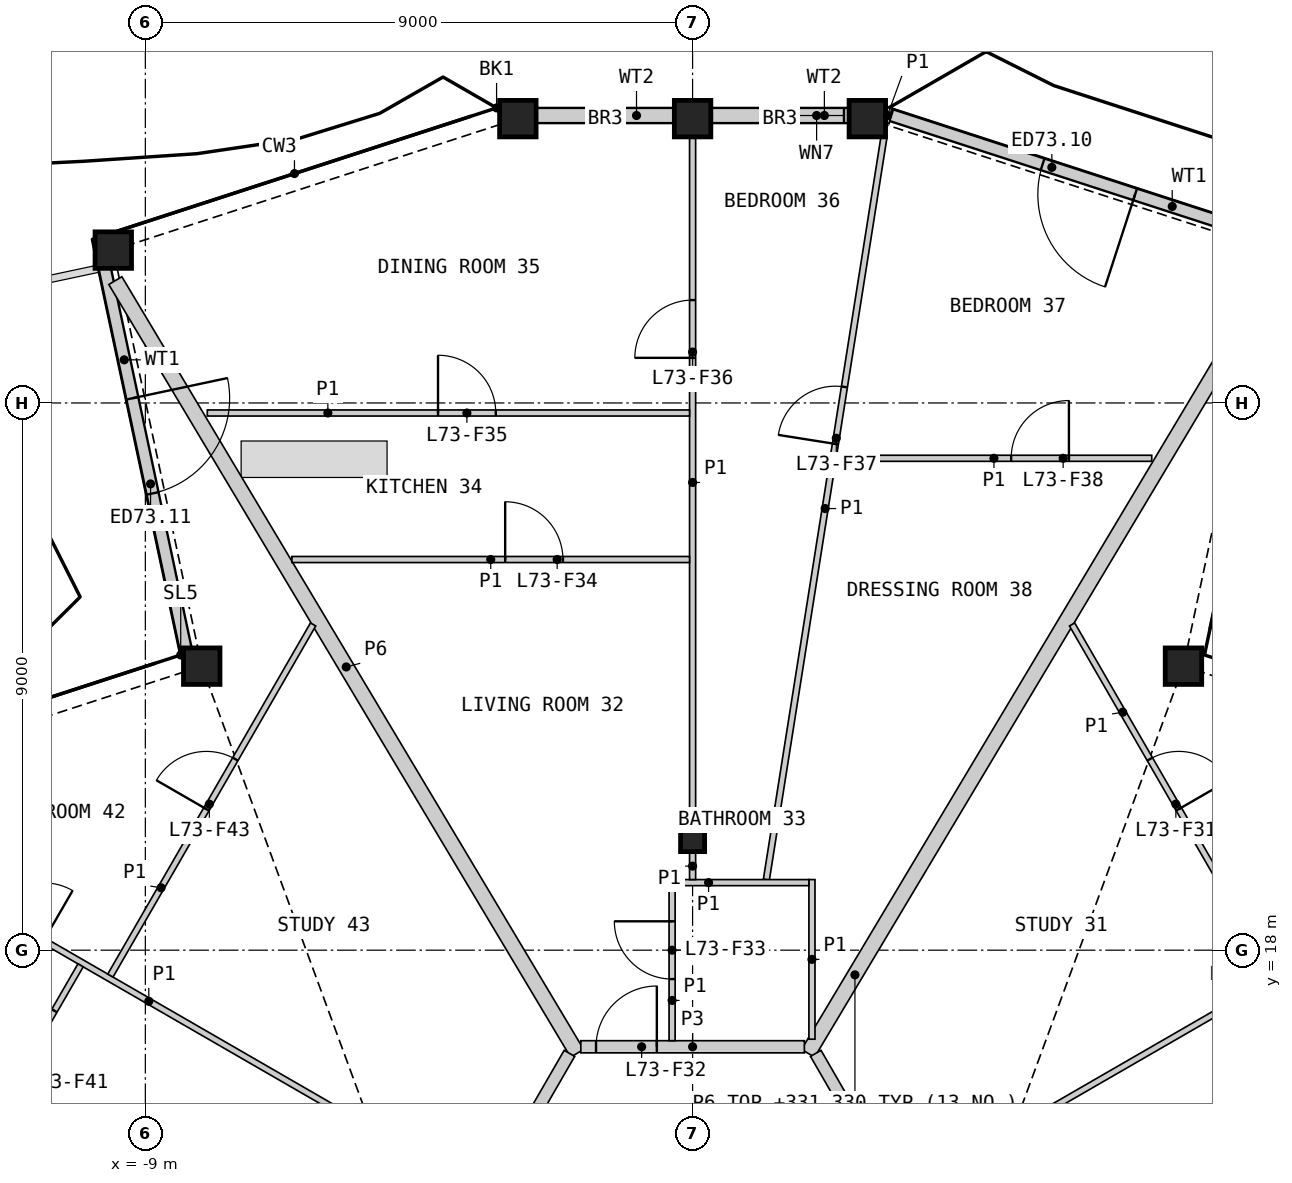
"""IFC4 building model, lengths in metres.
Left out: names, types, materials, properties, quantities, classifications, styles, units other than length and angle.
Written with IfcOpenShell. Run it as: python <this file> out.ifc"""

import sys

from ifc_helpers import new_model, si_unit, direction, frame, frame_2d, origin, origin_2d, place, context, subcontext, project, spatial, rectangle, hollow_rectangle, i_section, extrude, element, fill, save


model = new_model("IFC4")
c1 = context("Model", 3, precision=1e-05, world=origin(), true_north=direction((0.0, 1.0)))
c2 = subcontext(c1, "Body", "Model", "MODEL_VIEW")
j1 = project(units=[si_unit("LENGTHUNIT", "METRE"), si_unit("PLANEANGLEUNIT", "RADIAN")], contexts=[c1])
p1 = place(None, origin())
s1 = spatial("IfcSite", under=j1, at=p1, CompositionType="ELEMENT")
p2 = place(p1, origin())
s2 = spatial("IfcBuilding", under=s1, at=p2, CompositionType="ELEMENT")
p3 = place(p2, frame((0.0, 0.0, 329.0)))
s3 = spatial("IfcBuildingStorey", under=s2, at=p3, CompositionType="ELEMENT", Elevation=329.0)
for number, where, z_axis, x_axis in (
    (1, (8.073, 22.671, 0.0), (0.0, 0.0, 1.0), (1.0, 0.0, 0.0)),
    (2, (2.874, 31.676, 0.0), (0.0, 0.0, 1.0), (1.0, 0.0, 0.0)),
    (3, (0.0, 31.676, 0.0), (0.0, 0.0, 1.0), (1.0, 0.0, 0.0)),
    (4, (-2.874, 31.676, 0.0), (0.0, 0.0, 1.0), (1.0, 0.0, 0.0)),
    (5, (-9.527, 29.514, 0.0), (0.0, 0.0, 1.0), (1.0, 0.0, 0.0)),
    (6, (-8.073, 22.671, 0.0), (0.0, 0.0, 1.0), (1.0, 0.0, 0.0)),
):
    element("IfcColumn", number, at=place(p3, frame(where, z_axis=z_axis, x_axis=x_axis)), inside=s3, PredefinedType="COLUMN", context=c2, shape_type="SweptSolid", body=[
        extrude(hollow_rectangle(XDim=0.6, YDim=0.6, WallThickness=0.04, at=origin_2d()), origin(), (0.0, 0.0, 1.0), 3.4),
    ])
p4 = place(p3, frame((0.0, 19.811, 0.0), z_axis=(0.0, 0.0, 1.0), x_axis=(1.0, 0.0, 0.0)))
e7 = element("IfcColumn", 7, at=p4, inside=s3, PredefinedType="COLUMN", context=c2, shape_type="SweptSolid", body=[
    extrude(i_section(OverallWidth=0.396, OverallDepth=0.381, WebThickness=0.019, FlangeThickness=0.03, at=origin_2d()), origin(), (0.0, 0.0, 1.0), 3.4),
])
p5 = place(p3, frame((9.428, 29.732, 0.0), z_axis=(0.0, 0.0, 1.0), x_axis=(-0.951057057516, 0.309015328664, 0.0)))
e8 = element("IfcWall", 8, at=p5, inside=s3, PredefinedType="SOLIDWALL", context=c2, shape_type="SweptSolid", body=[
    extrude(rectangle(XDim=6.477, YDim=0.2, at=frame_2d((3.238, 0.0))), origin(), (0.0, 0.0, 1.0), 2.488),
])
p6 = place(p5, frame((2.261, 0.0, 0.0)))
e9 = element("IfcOpeningElement", 9, at=p6, cuts=e8, PredefinedType="OPENING", context=c2, shape_type="SweptSolid", body=[
    extrude(rectangle(XDim=1.6, YDim=2.25, at=frame_2d((0.8, 1.125))), frame((0.0, 0.11, 0.0), z_axis=(0.0, -1.0, 0.0), x_axis=(1.0, 0.0, 0.0)), (0.0, 0.0, 1.0), 0.22),
])
p7 = place(p3, frame((2.79, 31.728, 0.0), z_axis=(0.0, 0.0, 1.0), x_axis=(-1.0, 0.0, 0.0)))
e10 = element("IfcWall", 10, at=p7, inside=s3, PredefinedType="SOLIDWALL", context=c2, shape_type="SweptSolid", body=[
    extrude(rectangle(XDim=2.49, YDim=0.25, at=frame_2d((1.245, 0.0))), origin(), (0.0, 0.0, 1.0), 2.488),
])
p8 = place(p7, frame((0.3, 0.0, 0.4)))
e11 = element("IfcOpeningElement", 11, at=p8, cuts=e10, PredefinedType="OPENING", context=c2, shape_type="SweptSolid", body=[
    extrude(rectangle(XDim=0.9, YDim=0.6, at=frame_2d((0.45, 0.3))), frame((0.0, 0.135, 0.0), z_axis=(0.0, -1.0, 0.0), x_axis=(1.0, 0.0, 0.0)), (0.0, 0.0, 1.0), 0.27),
])
p9 = place(p3, frame((-0.3, 31.728, 0.0), z_axis=(0.0, 0.0, 1.0), x_axis=(-1.0, 0.0, 0.0)))
e12 = element("IfcWall", 12, at=p9, inside=s3, PredefinedType="SOLIDWALL", context=c2, shape_type="SweptSolid", body=[
    extrude(rectangle(XDim=2.49, YDim=0.25, at=frame_2d((1.245, 0.0))), origin(), (0.0, 0.0, 1.0), 2.488),
])
p10 = place(p3, frame((-9.684, 29.289, 0.0), z_axis=(0.0, 0.0, 1.0), x_axis=(0.207920686021, -0.978145688701, 0.0)))
e13 = element("IfcWall", 13, at=p10, inside=s3, PredefinedType="SOLIDWALL", context=c2, shape_type="SweptSolid", body=[
    extrude(rectangle(XDim=6.459, YDim=0.2, at=frame_2d((3.229, 0.0))), origin(), (0.0, 0.0, 1.0), 2.488),
])
p11 = place(p10, frame((2.261, 0.0, 0.0)))
e14 = element("IfcOpeningElement", 14, at=p11, cuts=e13, PredefinedType="OPENING", context=c2, shape_type="SweptSolid", body=[
    extrude(rectangle(XDim=1.6, YDim=2.25, at=frame_2d((0.8, 1.125))), frame((0.0, 0.11, 0.0), z_axis=(0.0, -1.0, 0.0), x_axis=(1.0, 0.0, 0.0)), (0.0, 0.0, 1.0), 0.22),
])
p12 = place(p3, frame((1.899, 16.304, 0.0), z_axis=(0.0, 0.0, 1.0), x_axis=(0.512977925681, 0.858401798556, 0.0)))
e15 = element("IfcWall", 15, at=p12, inside=s3, PredefinedType="PARTITIONING", context=c2, shape_type="SweptSolid", body=[
    extrude(rectangle(XDim=15.028, YDim=0.25, at=frame_2d((7.514, 0.0))), origin(), (0.0, 0.0, 1.0), 2.33),
])
p13 = place(p3, frame((-9.493, 29.012, 0.0), z_axis=(0.0, 0.0, 1.0), x_axis=(0.512967150926, -0.85840823742, 0.0)))
e16 = element("IfcWall", 16, at=p13, inside=s3, PredefinedType="PARTITIONING", context=c2, shape_type="SweptSolid", body=[
    extrude(rectangle(XDim=14.805, YDim=0.25, at=frame_2d((7.402, 0.0))), origin(), (0.0, 0.0, 1.0), 2.33),
])
for number, where, z_axis, x_axis in (
    (17, (2.025, 16.303, 0.0), (0.0, 0.0, 1.0), (0.5, -0.866, 0.0)),
    (18, (-4.169, 12.59, 0.0), (0.0, 0.0, 1.0), (0.5, 0.866, 0.0)),
):
    element("IfcWall", number, at=place(p3, frame(where, z_axis=z_axis, x_axis=x_axis)), inside=s3, PredefinedType="PARTITIONING", context=c2, shape_type="SweptSolid", body=[
        extrude(rectangle(XDim=4.288, YDim=0.2, at=frame_2d((2.144, 0.0))), origin(), (0.0, 0.0, 1.0), 3.1),
    ])
p14 = place(p3, frame((-1.838, 16.411, 0.0), z_axis=(0.0, 0.0, 1.0), x_axis=(1.0, 0.0, 0.0)))
e19 = element("IfcWall", 19, at=p14, inside=s3, PredefinedType="PARTITIONING", context=c2, shape_type="SweptSolid", body=[
    extrude(rectangle(XDim=3.676, YDim=0.2, at=frame_2d((1.838, 0.0))), origin(), (0.0, 0.0, 1.0), 3.1),
])
p15 = place(p14, frame((0.25, 0.0, 0.0)))
e20 = element("IfcOpeningElement", 20, at=p15, cuts=e19, PredefinedType="OPENING", context=c2, shape_type="SweptSolid", body=[
    extrude(rectangle(XDim=1.0, YDim=2.1, at=frame_2d((0.5, 1.05))), frame((0.0, 0.11, 0.0), z_axis=(0.0, -1.0, 0.0), x_axis=(1.0, 0.0, 0.0)), (0.0, 0.0, 1.0), 0.22),
])
p16 = place(p3, frame((-14.417, 20.32, 0.0), z_axis=(0.0, 0.0, 1.0), x_axis=(0.866021216079, -0.500007253249, 0.0)))
e21 = element("IfcWall", 21, at=p16, inside=s3, PredefinedType="PARTITIONING", context=c2, shape_type="SweptSolid", body=[
    extrude(rectangle(XDim=12.639, YDim=0.1, at=frame_2d((6.32, 0.0))), origin(), (0.0, 0.0, 1.0), 2.33),
])
p17 = place(p16, frame((3.375, 0.0, 0.0)))
e22 = element("IfcOpeningElement", 22, at=p17, cuts=e21, PredefinedType="OPENING", context=c2, shape_type="SweptSolid", body=[
    extrude(rectangle(XDim=0.95, YDim=2.1, at=frame_2d((0.475, 1.05))), frame((0.0, 0.06, 0.0), z_axis=(0.0, -1.0, 0.0), x_axis=(1.0, 0.0, 0.0)), (0.0, 0.0, 1.0), 0.12),
])
p18 = place(p3, frame((3.47, 14.0, 0.0), z_axis=(0.0, 0.0, 1.0), x_axis=(0.866021216079, 0.500007253249, 0.0)))
e23 = element("IfcWall", 23, at=p18, inside=s3, PredefinedType="PARTITIONING", context=c2, shape_type="SweptSolid", body=[
    extrude(rectangle(XDim=12.639, YDim=0.1, at=frame_2d((6.32, 0.0))), origin(), (0.0, 0.0, 1.0), 2.33),
])
p19 = place(p18, frame((8.314, 0.0, 0.0)))
e24 = element("IfcOpeningElement", 24, at=p19, cuts=e23, PredefinedType="OPENING", context=c2, shape_type="SweptSolid", body=[
    extrude(rectangle(XDim=0.95, YDim=2.1, at=frame_2d((0.475, 1.05))), frame((0.0, 0.06, 0.0), z_axis=(0.0, -1.0, 0.0), x_axis=(1.0, 0.0, 0.0)), (0.0, 0.0, 1.0), 0.12),
])
p20 = place(p3, frame((1.213, 19.16, 0.0), z_axis=(0.0, 0.0, 1.0), x_axis=(0.156426176129, 0.987689653394, 0.0)))
e25 = element("IfcWall", 25, at=p20, inside=s3, PredefinedType="PARTITIONING", context=c2, shape_type="SweptSolid", body=[
    extrude(rectangle(XDim=12.358, YDim=0.1, at=frame_2d((6.179, 0.0))), origin(), (0.0, 0.0, 1.0), 2.33),
])
p21 = place(p20, frame((7.255, 0.0, 0.0)))
e26 = element("IfcOpeningElement", 26, at=p21, cuts=e25, PredefinedType="OPENING", context=c2, shape_type="SweptSolid", body=[
    extrude(rectangle(XDim=0.95, YDim=2.1, at=frame_2d((0.475, 1.05))), frame((0.0, 0.06, 0.0), z_axis=(0.0, -1.0, 0.0), x_axis=(1.0, 0.0, 0.0)), (0.0, 0.0, 1.0), 0.12),
])
p22 = place(p3, frame((0.0, 20.019, 0.0), z_axis=(0.0, 0.0, 1.0), x_axis=(0.0, 1.0, 0.0)))
e27 = element("IfcWall", 27, at=p22, inside=s3, PredefinedType="PARTITIONING", context=c2, shape_type="SweptSolid", body=[
    extrude(rectangle(XDim=11.347, YDim=0.1, at=frame_2d((5.674, 0.0))), origin(), (0.0, 0.0, 1.0), 2.33),
])
p23 = place(p22, frame((7.723, 0.0, 0.0)))
e28 = element("IfcOpeningElement", 28, at=p23, cuts=e27, PredefinedType="OPENING", context=c2, shape_type="SweptSolid", body=[
    extrude(rectangle(XDim=0.95, YDim=2.1, at=frame_2d((0.475, 1.05))), frame((0.0, 0.06, 0.0), z_axis=(0.0, -1.0, 0.0), x_axis=(1.0, 0.0, 0.0)), (0.0, 0.0, 1.0), 0.12),
])
p24 = place(p3, frame((-7.981, 26.835, 0.0), z_axis=(0.0, 0.0, 1.0), x_axis=(1.0, 0.0, 0.0)))
e29 = element("IfcWall", 29, at=p24, inside=s3, PredefinedType="PARTITIONING", context=c2, shape_type="SweptSolid", body=[
    extrude(rectangle(XDim=7.931, YDim=0.1, at=frame_2d((3.966, 0.0))), origin(), (0.0, 0.0, 1.0), 2.33),
])
p25 = place(p24, frame((3.794, 0.0, 0.0)))
e30 = element("IfcOpeningElement", 30, at=p25, cuts=e29, PredefinedType="OPENING", context=c2, shape_type="SweptSolid", body=[
    extrude(rectangle(XDim=0.95, YDim=2.1, at=frame_2d((0.475, 1.05))), frame((0.0, 0.06, 0.0), z_axis=(0.0, -1.0, 0.0), x_axis=(1.0, 0.0, 0.0)), (0.0, 0.0, 1.0), 0.12),
])
p26 = place(p3, frame((6.241, 23.357, 0.0), z_axis=(0.0, 0.0, 1.0), x_axis=(0.499998189891, -0.866026448849, 0.0)))
e31 = element("IfcWall", 31, at=p26, inside=s3, PredefinedType="PARTITIONING", context=c2, shape_type="SweptSolid", body=[
    extrude(rectangle(XDim=6.668, YDim=0.1, at=frame_2d((3.334, 0.0))), origin(), (0.0, 0.0, 1.0), 2.33),
])
p27 = place(p26, frame((2.558, 0.0, 0.0)))
e32 = element("IfcOpeningElement", 32, at=p27, cuts=e31, PredefinedType="OPENING", context=c2, shape_type="SweptSolid", body=[
    extrude(rectangle(XDim=0.95, YDim=2.1, at=frame_2d((0.475, 1.05))), frame((0.0, 0.06, 0.0), z_axis=(0.0, -1.0, 0.0), x_axis=(1.0, 0.0, 0.0)), (0.0, 0.0, 1.0), 0.12),
])
p28 = place(p3, frame((-9.575, 17.583, 0.0), z_axis=(0.0, 0.0, 1.0), x_axis=(0.499998189891, 0.866026448849, 0.0)))
e33 = element("IfcWall", 33, at=p28, inside=s3, PredefinedType="PARTITIONING", context=c2, shape_type="SweptSolid", body=[
    extrude(rectangle(XDim=6.668, YDim=0.1, at=frame_2d((3.334, 0.0))), origin(), (0.0, 0.0, 1.0), 2.33),
])
p29 = place(p28, frame((3.16, 0.0, 0.0)))
e34 = element("IfcOpeningElement", 34, at=p29, cuts=e33, PredefinedType="OPENING", context=c2, shape_type="SweptSolid", body=[
    extrude(rectangle(XDim=0.95, YDim=2.1, at=frame_2d((0.475, 1.05))), frame((0.0, 0.06, 0.0), z_axis=(0.0, -1.0, 0.0), x_axis=(1.0, 0.0, 0.0)), (0.0, 0.0, 1.0), 0.12),
])
p30 = place(p3, frame((-6.59, 24.425, 0.0), z_axis=(0.0, 0.0, 1.0), x_axis=(1.0, 0.0, 0.0)))
e35 = element("IfcWall", 35, at=p30, inside=s3, PredefinedType="PARTITIONING", context=c2, shape_type="SweptSolid", body=[
    extrude(rectangle(XDim=6.54, YDim=0.1, at=frame_2d((3.27, 0.0))), origin(), (0.0, 0.0, 1.0), 2.33),
])
p31 = place(p30, frame((3.508, 0.0, 0.0)))
e36 = element("IfcOpeningElement", 36, at=p31, cuts=e35, PredefinedType="OPENING", context=c2, shape_type="SweptSolid", body=[
    extrude(rectangle(XDim=0.95, YDim=2.1, at=frame_2d((0.475, 1.05))), frame((0.0, 0.06, 0.0), z_axis=(0.0, -1.0, 0.0), x_axis=(1.0, 0.0, 0.0)), (0.0, 0.0, 1.0), 0.12),
])
p32 = place(p3, frame((2.361, 26.09, 0.0), z_axis=(0.0, 0.0, 1.0), x_axis=(1.0, 0.0, 0.0)))
e37 = element("IfcWall", 37, at=p32, inside=s3, PredefinedType="PARTITIONING", context=c2, shape_type="SweptSolid", body=[
    extrude(rectangle(XDim=5.19, YDim=0.1, at=frame_2d((2.595, 0.0))), origin(), (0.0, 0.0, 1.0), 2.33),
])
p33 = place(p32, frame((2.878, 0.0, 0.0)))
e38 = element("IfcOpeningElement", 38, at=p33, cuts=e37, PredefinedType="OPENING", context=c2, shape_type="SweptSolid", body=[
    extrude(rectangle(XDim=0.95, YDim=2.1, at=frame_2d((0.475, 1.05))), frame((0.0, 0.06, 0.0), z_axis=(0.0, -1.0, 0.0), x_axis=(1.0, 0.0, 0.0)), (0.0, 0.0, 1.0), 0.12),
])
p34 = place(p3, frame((-12.575, 13.403, 0.0), z_axis=(0.0, 0.0, 1.0), x_axis=(0.499989096993, 0.866031698547, 0.0)))
e39 = element("IfcWall", 39, at=p34, inside=s3, PredefinedType="PARTITIONING", context=c2, shape_type="SweptSolid", body=[
    extrude(rectangle(XDim=5.02, YDim=0.1, at=frame_2d((2.51, 0.0))), origin(), (0.0, 0.0, 1.0), 2.33),
])
p35 = place(p34, frame((3.208, 0.0, 0.0)))
e40 = element("IfcOpeningElement", 40, at=p35, cuts=e39, PredefinedType="OPENING", context=c2, shape_type="SweptSolid", body=[
    extrude(rectangle(XDim=0.95, YDim=2.1, at=frame_2d((0.475, 1.05))), frame((0.0, 0.06, 0.0), z_axis=(0.0, -1.0, 0.0), x_axis=(1.0, 0.0, 0.0)), (0.0, 0.0, 1.0), 0.12),
])
p36 = place(p3, frame((-0.337, 16.511, 0.0), z_axis=(0.0, 0.0, 1.0), x_axis=(0.0, 1.0, 0.0)))
e41 = element("IfcWall", 41, at=p36, inside=s3, PredefinedType="PARTITIONING", context=c2, shape_type="SweptSolid", body=[
    extrude(rectangle(XDim=2.65, YDim=0.1, at=frame_2d((1.325, 0.0))), origin(), (0.0, 0.0, 1.0), 2.33),
])
p37 = place(p36, frame((1.014, 0.0, 0.0)))
e42 = element("IfcOpeningElement", 42, at=p37, cuts=e41, PredefinedType="OPENING", context=c2, shape_type="SweptSolid", body=[
    extrude(rectangle(XDim=0.95, YDim=2.1, at=frame_2d((0.475, 1.05))), frame((0.0, 0.06, 0.0), z_axis=(0.0, -1.0, 0.0), x_axis=(1.0, 0.0, 0.0)), (0.0, 0.0, 1.0), 0.12),
])
p38 = place(p3, frame((1.963, 16.536, 0.0), z_axis=(0.0, 0.0, 1.0), x_axis=(0.0, 1.0, 0.0)))
e43 = element("IfcWall", 43, at=p38, inside=s3, PredefinedType="PARTITIONING", context=c2, shape_type="SweptSolid", body=[
    extrude(rectangle(XDim=2.625, YDim=0.1, at=frame_2d((1.312, 0.0))), origin(), (0.0, 0.0, 1.0), 2.33),
])
p39 = place(p3, frame((-0.287, 19.111, 0.0), z_axis=(0.0, 0.0, 1.0), x_axis=(1.0, 0.0, 0.0)))
e44 = element("IfcWall", 44, at=p39, inside=s3, PredefinedType="PARTITIONING", context=c2, shape_type="SweptSolid", body=[
    extrude(rectangle(XDim=2.2, YDim=0.1, at=frame_2d((1.1, 0.0))), origin(), (0.0, 0.0, 1.0), 2.33),
])
p40 = place(p3, frame((0.0, 19.161, 0.0), z_axis=(0.0, 0.0, 1.0), x_axis=(0.0, 1.0, 0.0)))
e45 = element("IfcWall", 45, at=p40, inside=s3, PredefinedType="PARTITIONING", context=c2, shape_type="SweptSolid", body=[
    extrude(rectangle(XDim=0.442, YDim=0.1, at=frame_2d((0.221, 0.0))), origin(), (0.0, 0.0, 1.0), 2.33),
])
p41 = place(p3, frame((3.184, 31.601, 0.0), z_axis=(0.0, 0.0, 1.0), x_axis=(0.156307264128, 0.987708478844, 0.0)))
e46 = element("IfcWall", 46, at=p41, inside=s3, PredefinedType="PARTITIONING", context=c2, shape_type="SweptSolid", body=[
    extrude(rectangle(XDim=0.255, YDim=0.1, at=frame_2d((0.127, 0.0))), origin(), (0.0, 0.0, 1.0), 2.33),
])
p42 = place(p6, origin())
e47 = element("IfcDoor", 47, at=p42, inside=s3, OperationType="DOUBLE_DOOR_SINGLE_SWING", PredefinedType="DOOR", context=c2, shape_type="SweptSolid", body=[
    extrude(rectangle(XDim=1.6, YDim=2.25, at=frame_2d((0.8, 1.125))), frame((0.0, 0.025, 0.0), z_axis=(0.0, -1.0, 0.0), x_axis=(1.0, 0.0, 0.0)), (0.0, 0.0, 1.0), 0.05),
])
fill(e9, e47)
p43 = place(p8, origin())
e48 = element("IfcWindow", 48, at=p43, inside=s3, PartitioningType="SINGLE_PANEL", PredefinedType="WINDOW", context=c2, shape_type="SweptSolid", body=[
    extrude(rectangle(XDim=0.9, YDim=0.6, at=frame_2d((0.45, 0.3))), frame((0.0, 0.03, 0.0), z_axis=(0.0, -1.0, 0.0), x_axis=(1.0, 0.0, 0.0)), (0.0, 0.0, 1.0), 0.06),
])
fill(e11, e48)
p44 = place(p11, origin())
e49 = element("IfcDoor", 49, at=p44, inside=s3, OperationType="DOUBLE_DOOR_SINGLE_SWING", PredefinedType="DOOR", context=c2, shape_type="SweptSolid", body=[
    extrude(rectangle(XDim=1.6, YDim=2.25, at=frame_2d((0.8, 1.125))), frame((0.0, 0.025, 0.0), z_axis=(0.0, -1.0, 0.0), x_axis=(1.0, 0.0, 0.0)), (0.0, 0.0, 1.0), 0.05),
])
fill(e14, e49)
p45 = place(p27, origin())
e50 = element("IfcDoor", 50, at=p45, inside=s3, OperationType="SINGLE_SWING_RIGHT", PredefinedType="DOOR", context=c2, shape_type="SweptSolid", body=[
    extrude(rectangle(XDim=0.95, YDim=2.1, at=frame_2d((0.475, 1.05))), frame((0.0, 0.025, 0.0), z_axis=(0.0, -1.0, 0.0), x_axis=(1.0, 0.0, 0.0)), (0.0, 0.0, 1.0), 0.05),
])
fill(e32, e50)
p46 = place(p15, origin())
e51 = element("IfcDoor", 51, at=p46, inside=s3, OperationType="SINGLE_SWING_RIGHT", PredefinedType="DOOR", context=c2, shape_type="SweptSolid", body=[
    extrude(rectangle(XDim=1.0, YDim=2.1, at=frame_2d((0.5, 1.05))), frame((0.0, 0.025, 0.0), z_axis=(0.0, -1.0, 0.0), x_axis=(1.0, 0.0, 0.0)), (0.0, 0.0, 1.0), 0.05),
])
fill(e20, e51)
p47 = place(p37, origin())
e52 = element("IfcDoor", 52, at=p47, inside=s3, OperationType="SINGLE_SWING_RIGHT", PredefinedType="DOOR", context=c2, shape_type="SweptSolid", body=[
    extrude(rectangle(XDim=0.95, YDim=2.1, at=frame_2d((0.475, 1.05))), frame((0.0, 0.025, 0.0), z_axis=(0.0, -1.0, 0.0), x_axis=(1.0, 0.0, 0.0)), (0.0, 0.0, 1.0), 0.05),
])
fill(e42, e52)
p48 = place(p31, origin())
e53 = element("IfcDoor", 53, at=p48, inside=s3, OperationType="SINGLE_SWING_LEFT", PredefinedType="DOOR", context=c2, shape_type="SweptSolid", body=[
    extrude(rectangle(XDim=0.95, YDim=2.1, at=frame_2d((0.475, 1.05))), frame((0.0, 0.025, 0.0), z_axis=(0.0, -1.0, 0.0), x_axis=(1.0, 0.0, 0.0)), (0.0, 0.0, 1.0), 0.05),
])
fill(e36, e53)
p49 = place(p25, origin())
e54 = element("IfcDoor", 54, at=p49, inside=s3, OperationType="SINGLE_SWING_LEFT", PredefinedType="DOOR", context=c2, shape_type="SweptSolid", body=[
    extrude(rectangle(XDim=0.95, YDim=2.1, at=frame_2d((0.475, 1.05))), frame((0.0, 0.025, 0.0), z_axis=(0.0, -1.0, 0.0), x_axis=(1.0, 0.0, 0.0)), (0.0, 0.0, 1.0), 0.05),
])
fill(e30, e54)
p50 = place(p23, origin())
e55 = element("IfcDoor", 55, at=p50, inside=s3, OperationType="SINGLE_SWING_LEFT", PredefinedType="DOOR", context=c2, shape_type="SweptSolid", body=[
    extrude(rectangle(XDim=0.95, YDim=2.1, at=frame_2d((0.475, 1.05))), frame((0.0, 0.025, 0.0), z_axis=(0.0, -1.0, 0.0), x_axis=(1.0, 0.0, 0.0)), (0.0, 0.0, 1.0), 0.05),
])
fill(e28, e55)
p51 = place(p21, origin())
e56 = element("IfcDoor", 56, at=p51, inside=s3, OperationType="SINGLE_SWING_LEFT", PredefinedType="DOOR", context=c2, shape_type="SweptSolid", body=[
    extrude(rectangle(XDim=0.95, YDim=2.1, at=frame_2d((0.475, 1.05))), frame((0.0, 0.025, 0.0), z_axis=(0.0, -1.0, 0.0), x_axis=(1.0, 0.0, 0.0)), (0.0, 0.0, 1.0), 0.05),
])
fill(e26, e56)
p52 = place(p33, origin())
e57 = element("IfcDoor", 57, at=p52, inside=s3, OperationType="SINGLE_SWING_RIGHT", PredefinedType="DOOR", context=c2, shape_type="SweptSolid", body=[
    extrude(rectangle(XDim=0.95, YDim=2.1, at=frame_2d((0.475, 1.05))), frame((0.0, 0.025, 0.0), z_axis=(0.0, -1.0, 0.0), x_axis=(1.0, 0.0, 0.0)), (0.0, 0.0, 1.0), 0.05),
])
fill(e38, e57)
p53 = place(p35, origin())
e58 = element("IfcDoor", 58, at=p53, inside=s3, OperationType="SINGLE_SWING_RIGHT", PredefinedType="DOOR", context=c2, shape_type="SweptSolid", body=[
    extrude(rectangle(XDim=0.95, YDim=2.1, at=frame_2d((0.475, 1.05))), frame((0.0, 0.025, 0.0), z_axis=(0.0, -1.0, 0.0), x_axis=(1.0, 0.0, 0.0)), (0.0, 0.0, 1.0), 0.05),
])
fill(e40, e58)
p54 = place(p29, origin())
e59 = element("IfcDoor", 59, at=p54, inside=s3, OperationType="SINGLE_SWING_LEFT", PredefinedType="DOOR", context=c2, shape_type="SweptSolid", body=[
    extrude(rectangle(XDim=0.95, YDim=2.1, at=frame_2d((0.475, 1.05))), frame((0.0, 0.025, 0.0), z_axis=(0.0, -1.0, 0.0), x_axis=(1.0, 0.0, 0.0)), (0.0, 0.0, 1.0), 0.05),
])
fill(e34, e59)
save(model, sys.argv[1])
